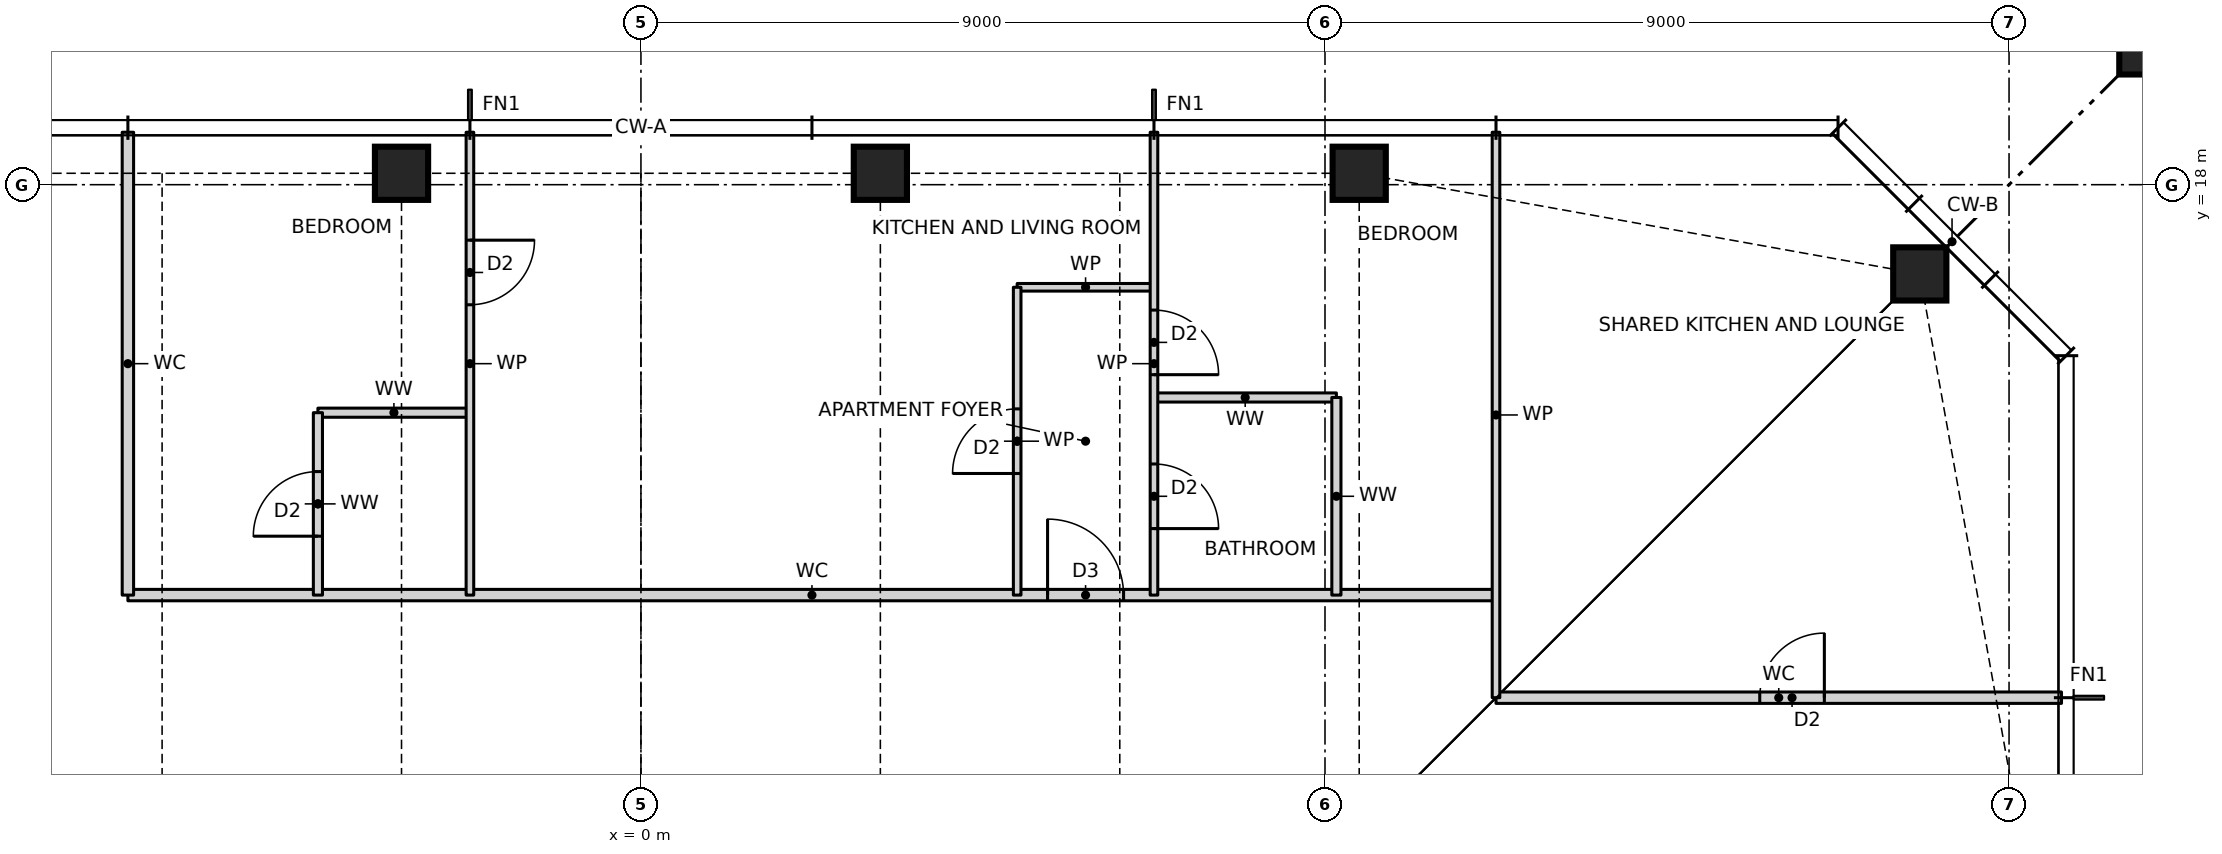
"""IFC4 building model, lengths in metres.
Left out: names, types, materials, properties, quantities, classifications, styles, units other than length and angle.
Written with IfcOpenShell. Run it as: python <this file> out.ifc"""

import sys

from ifc_helpers import new_model, si_unit, direction, frame, frame_2d, origin, origin_2d, place, context, subcontext, project, spatial, rectangle, hollow_rectangle, i_section, extrude, element, fill, save


model = new_model("IFC4")
c1 = context("Model", 3, precision=1e-05, world=origin(), true_north=direction((0.0, 1.0)))
c2 = subcontext(c1, "Body", "Model", "MODEL_VIEW")
j1 = project(units=[si_unit("LENGTHUNIT", "METRE"), si_unit("PLANEANGLEUNIT", "RADIAN")], contexts=[c1])
p1 = place(None, origin())
s1 = spatial("IfcSite", under=j1, at=p1, CompositionType="ELEMENT")
p2 = place(p1, origin())
s2 = spatial("IfcBuilding", under=s1, at=p2, CompositionType="ELEMENT")
p3 = place(p2, frame((0.0, 0.0, 181.0)))
s3 = spatial("IfcBuildingStorey", under=s2, at=p3, CompositionType="ELEMENT", Elevation=181.0)
for number, where, z_axis, x_axis in (
    (1, (16.826, 16.826, 0.0), (0.0, 0.0, 1.0), (1.0, 0.0, 0.0)),
    (2, (9.45, 18.15, 0.0), (0.0, 0.0, 1.0), (1.0, 0.0, 0.0)),
    (3, (3.15, 18.15, 0.0), (0.0, 0.0, 1.0), (1.0, 0.0, 0.0)),
    (4, (-3.15, 18.15, 0.0), (0.0, 0.0, 1.0), (1.0, 0.0, 0.0)),
):
    element("IfcColumn", number, at=place(p3, frame(where, z_axis=z_axis, x_axis=x_axis)), inside=s3, PredefinedType="COLUMN", context=c2, shape_type="SweptSolid", body=[
        extrude(hollow_rectangle(XDim=0.7, YDim=0.7, WallThickness=0.06, at=origin_2d()), origin(), (0.0, 0.0, 1.0), 3.5),
    ])
p4 = place(p3, frame((21.65, 21.65, 0.0), z_axis=(0.0, 0.0, 1.0), x_axis=(1.0, 0.0, 0.0)))
e5 = element("IfcColumn", 5, at=p4, inside=s3, PredefinedType="COLUMN", context=c2, shape_type="SweptSolid", body=[
    extrude(rectangle(XDim=4.4, YDim=4.4, at=origin_2d()), origin(), (0.0, 0.0, 1.0), 3.5),
    extrude(i_section(OverallWidth=0.478, OverallDepth=0.599, WebThickness=0.1, FlangeThickness=0.14, at=origin_2d()), origin(), (0.0, 0.0, 1.0), 3.5),
])
p5 = place(p3, frame((11.25, 11.25, 0.0), z_axis=(0.0, 0.0, 1.0), x_axis=(1.0, 0.0, 0.0)))
e6 = element("IfcWall", 6, at=p5, inside=s3, PredefinedType="PARTITIONING", context=c2, shape_type="SweptSolid", body=[
    extrude(rectangle(XDim=7.44, YDim=0.15, at=frame_2d((3.72, 0.0))), origin(), (0.0, 0.0, 1.0), 3.27),
])
p6 = place(p5, frame((3.47, 0.0, 0.0)))
e7 = element("IfcOpeningElement", 7, at=p6, cuts=e6, PredefinedType="OPENING", context=c2, shape_type="SweptSolid", body=[
    extrude(rectangle(XDim=0.85, YDim=2.1, at=frame_2d((0.425, 1.05))), frame((0.0, 0.085, 0.0), z_axis=(0.0, -1.0, 0.0), x_axis=(1.0, 0.0, 0.0)), (0.0, 0.0, 1.0), 0.17),
])
p7 = place(p3, frame((-6.75, 12.6, 0.0), z_axis=(0.0, 0.0, 1.0), x_axis=(1.0, 0.0, 0.0)))
e8 = element("IfcWall", 8, at=p7, inside=s3, PredefinedType="PARTITIONING", context=c2, shape_type="SweptSolid", body=[
    extrude(rectangle(XDim=18.0, YDim=0.15, at=frame_2d((9.0, 0.0))), origin(), (0.0, 0.0, 1.0), 3.27),
])
p8 = place(p7, frame((12.1, 0.0, 0.0)))
e9 = element("IfcOpeningElement", 9, at=p8, cuts=e8, PredefinedType="OPENING", context=c2, shape_type="SweptSolid", body=[
    extrude(rectangle(XDim=1.0, YDim=2.1, at=frame_2d((0.5, 1.05))), frame((0.0, 0.085, 0.0), z_axis=(0.0, -1.0, 0.0), x_axis=(1.0, 0.0, 0.0)), (0.0, 0.0, 1.0), 0.17),
])
p9 = place(p3, frame((-4.25, 15.0, 0.0), z_axis=(0.0, 0.0, 1.0), x_axis=(1.0, 0.0, 0.0)))
e10 = element("IfcWall", 10, at=p9, inside=s3, PredefinedType="PARTITIONING", context=c2, shape_type="SweptSolid", body=[
    extrude(rectangle(XDim=2.0, YDim=0.12, at=frame_2d((1.0, 0.0))), origin(), (0.0, 0.0, 1.0), 3.27),
])
p10 = place(p3, frame((6.75, 15.2, 0.0), z_axis=(0.0, 0.0, 1.0), x_axis=(1.0, 0.0, 0.0)))
e11 = element("IfcWall", 11, at=p10, inside=s3, PredefinedType="PARTITIONING", context=c2, shape_type="SweptSolid", body=[
    extrude(rectangle(XDim=2.4, YDim=0.12, at=frame_2d((1.2, 0.0))), origin(), (0.0, 0.0, 1.0), 3.27),
])
p11 = place(p3, frame((4.95, 16.65, 0.0), z_axis=(0.0, 0.0, 1.0), x_axis=(1.0, 0.0, 0.0)))
e12 = element("IfcWall", 12, at=p11, inside=s3, PredefinedType="PARTITIONING", context=c2, shape_type="SweptSolid", body=[
    extrude(rectangle(XDim=1.8, YDim=0.1, at=frame_2d((0.9, 0.0))), origin(), (0.0, 0.0, 1.0), 3.27),
])
p12 = place(p3, frame((11.25, 11.25, 0.0), z_axis=(0.0, 0.0, 1.0), x_axis=(0.0, 1.0, 0.0)))
e13 = element("IfcWall", 13, at=p12, inside=s3, PredefinedType="PARTITIONING", context=c2, shape_type="SweptSolid", body=[
    extrude(rectangle(XDim=7.44, YDim=0.1, at=frame_2d((3.72, 0.0))), origin(), (0.0, 0.0, 1.0), 3.27),
])
p13 = place(p3, frame((9.15, 12.6, 0.0), z_axis=(0.0, 0.0, 1.0), x_axis=(0.0, 1.0, 0.0)))
e14 = element("IfcWall", 14, at=p13, inside=s3, PredefinedType="PARTITIONING", context=c2, shape_type="SweptSolid", body=[
    extrude(rectangle(XDim=2.6, YDim=0.12, at=frame_2d((1.3, 0.0))), origin(), (0.0, 0.0, 1.0), 3.27),
])
p14 = place(p3, frame((6.75, 12.6, 0.0), z_axis=(0.0, 0.0, 1.0), x_axis=(0.0, 1.0, 0.0)))
e15 = element("IfcWall", 15, at=p14, inside=s3, PredefinedType="PARTITIONING", context=c2, shape_type="SweptSolid", body=[
    extrude(rectangle(XDim=6.09, YDim=0.1, at=frame_2d((3.045, 0.0))), origin(), (0.0, 0.0, 1.0), 3.27),
])
p15 = place(p14, frame((2.9, 0.0, 0.0)))
e16 = element("IfcOpeningElement", 16, at=p15, cuts=e15, PredefinedType="OPENING", context=c2, shape_type="SweptSolid", body=[
    extrude(rectangle(XDim=0.85, YDim=2.1, at=frame_2d((0.425, 1.05))), frame((0.0, 0.06, 0.0), z_axis=(0.0, -1.0, 0.0), x_axis=(1.0, 0.0, 0.0)), (0.0, 0.0, 1.0), 0.12),
])
p16 = place(p14, frame((0.875, 0.0, 0.0)))
e17 = element("IfcOpeningElement", 17, at=p16, cuts=e15, PredefinedType="OPENING", context=c2, shape_type="SweptSolid", body=[
    extrude(rectangle(XDim=0.85, YDim=2.1, at=frame_2d((0.425, 1.05))), frame((0.0, 0.06, 0.0), z_axis=(0.0, -1.0, 0.0), x_axis=(1.0, 0.0, 0.0)), (0.0, 0.0, 1.0), 0.12),
])
p17 = place(p3, frame((4.95, 12.6, 0.0), z_axis=(0.0, 0.0, 1.0), x_axis=(0.0, 1.0, 0.0)))
e18 = element("IfcWall", 18, at=p17, inside=s3, PredefinedType="PARTITIONING", context=c2, shape_type="SweptSolid", body=[
    extrude(rectangle(XDim=4.05, YDim=0.1, at=frame_2d((2.025, 0.0))), origin(), (0.0, 0.0, 1.0), 3.27),
])
p18 = place(p17, frame((1.6, 0.0, 0.0)))
e19 = element("IfcOpeningElement", 19, at=p18, cuts=e18, PredefinedType="OPENING", context=c2, shape_type="SweptSolid", body=[
    extrude(rectangle(XDim=0.85, YDim=2.1, at=frame_2d((0.425, 1.05))), frame((0.0, 0.06, 0.0), z_axis=(0.0, -1.0, 0.0), x_axis=(1.0, 0.0, 0.0)), (0.0, 0.0, 1.0), 0.12),
])
p19 = place(p3, frame((-2.25, 12.6, 0.0), z_axis=(0.0, 0.0, 1.0), x_axis=(0.0, 1.0, 0.0)))
e20 = element("IfcWall", 20, at=p19, inside=s3, PredefinedType="PARTITIONING", context=c2, shape_type="SweptSolid", body=[
    extrude(rectangle(XDim=6.09, YDim=0.1, at=frame_2d((3.045, 0.0))), origin(), (0.0, 0.0, 1.0), 3.27),
])
p20 = place(p19, frame((3.82, 0.0, 0.0)))
e21 = element("IfcOpeningElement", 21, at=p20, cuts=e20, PredefinedType="OPENING", context=c2, shape_type="SweptSolid", body=[
    extrude(rectangle(XDim=0.85, YDim=2.1, at=frame_2d((0.425, 1.05))), frame((0.0, 0.06, 0.0), z_axis=(0.0, -1.0, 0.0), x_axis=(1.0, 0.0, 0.0)), (0.0, 0.0, 1.0), 0.12),
])
p21 = place(p3, frame((-4.25, 12.6, 0.0), z_axis=(0.0, 0.0, 1.0), x_axis=(0.0, 1.0, 0.0)))
e22 = element("IfcWall", 22, at=p21, inside=s3, PredefinedType="PARTITIONING", context=c2, shape_type="SweptSolid", body=[
    extrude(rectangle(XDim=2.4, YDim=0.12, at=frame_2d((1.2, 0.0))), origin(), (0.0, 0.0, 1.0), 3.27),
])
p22 = place(p21, frame((0.775, 0.0, 0.0)))
e23 = element("IfcOpeningElement", 23, at=p22, cuts=e22, PredefinedType="OPENING", context=c2, shape_type="SweptSolid", body=[
    extrude(rectangle(XDim=0.85, YDim=2.1, at=frame_2d((0.425, 1.05))), frame((0.0, 0.07, 0.0), z_axis=(0.0, -1.0, 0.0), x_axis=(1.0, 0.0, 0.0)), (0.0, 0.0, 1.0), 0.14),
])
p23 = place(p3, frame((-6.75, 12.6, 0.0), z_axis=(0.0, 0.0, 1.0), x_axis=(0.0, 1.0, 0.0)))
e24 = element("IfcWall", 24, at=p23, inside=s3, PredefinedType="PARTITIONING", context=c2, shape_type="SweptSolid", body=[
    extrude(rectangle(XDim=6.09, YDim=0.15, at=frame_2d((3.045, 0.0))), origin(), (0.0, 0.0, 1.0), 3.27),
])
p24 = place(p8, origin())
e25 = element("IfcDoor", 25, at=p24, inside=s3, OperationType="SINGLE_SWING_LEFT", PredefinedType="DOOR", context=c2, shape_type="SweptSolid", body=[
    extrude(rectangle(XDim=1.0, YDim=2.1, at=frame_2d((0.5, 1.05))), frame((0.0, 0.025, 0.0), z_axis=(0.0, -1.0, 0.0), x_axis=(1.0, 0.0, 0.0)), (0.0, 0.0, 1.0), 0.05),
])
fill(e9, e25)
p25 = place(p18, origin())
e26 = element("IfcDoor", 26, at=p25, inside=s3, OperationType="SINGLE_SWING_LEFT", PredefinedType="DOOR", context=c2, shape_type="SweptSolid", body=[
    extrude(rectangle(XDim=0.85, YDim=2.1, at=frame_2d((0.425, 1.05))), frame((0.0, 0.025, 0.0), z_axis=(0.0, -1.0, 0.0), x_axis=(1.0, 0.0, 0.0)), (0.0, 0.0, 1.0), 0.05),
])
fill(e19, e26)
p26 = place(p15, frame((0.85, 0.0, 0.0), z_axis=(0.0, 0.0, 1.0), x_axis=(-1.0, 0.0, 0.0)))
e27 = element("IfcDoor", 27, at=p26, inside=s3, OperationType="SINGLE_SWING_RIGHT", PredefinedType="DOOR", context=c2, shape_type="SweptSolid", body=[
    extrude(rectangle(XDim=0.85, YDim=2.1, at=frame_2d((0.425, 1.05))), frame((0.0, 0.025, 0.0), z_axis=(0.0, -1.0, 0.0), x_axis=(1.0, 0.0, 0.0)), (0.0, 0.0, 1.0), 0.05),
])
fill(e16, e27)
p27 = place(p16, frame((0.85, 0.0, 0.0), z_axis=(0.0, 0.0, 1.0), x_axis=(-1.0, 0.0, 0.0)))
e28 = element("IfcDoor", 28, at=p27, inside=s3, OperationType="SINGLE_SWING_RIGHT", PredefinedType="DOOR", context=c2, shape_type="SweptSolid", body=[
    extrude(rectangle(XDim=0.85, YDim=2.1, at=frame_2d((0.425, 1.05))), frame((0.0, 0.025, 0.0), z_axis=(0.0, -1.0, 0.0), x_axis=(1.0, 0.0, 0.0)), (0.0, 0.0, 1.0), 0.05),
])
fill(e17, e28)
p28 = place(p20, frame((0.85, 0.0, 0.0), z_axis=(0.0, 0.0, 1.0), x_axis=(-1.0, 0.0, 0.0)))
e29 = element("IfcDoor", 29, at=p28, inside=s3, OperationType="SINGLE_SWING_LEFT", PredefinedType="DOOR", context=c2, shape_type="SweptSolid", body=[
    extrude(rectangle(XDim=0.85, YDim=2.1, at=frame_2d((0.425, 1.05))), frame((0.0, 0.025, 0.0), z_axis=(0.0, -1.0, 0.0), x_axis=(1.0, 0.0, 0.0)), (0.0, 0.0, 1.0), 0.05),
])
fill(e21, e29)
p29 = place(p22, origin())
e30 = element("IfcDoor", 30, at=p29, inside=s3, OperationType="SINGLE_SWING_LEFT", PredefinedType="DOOR", context=c2, shape_type="SweptSolid", body=[
    extrude(rectangle(XDim=0.85, YDim=2.1, at=frame_2d((0.425, 1.05))), frame((0.0, 0.025, 0.0), z_axis=(0.0, -1.0, 0.0), x_axis=(1.0, 0.0, 0.0)), (0.0, 0.0, 1.0), 0.05),
])
fill(e23, e30)
p30 = place(p6, origin())
e31 = element("IfcDoor", 31, at=p30, inside=s3, OperationType="SINGLE_SWING_RIGHT", PredefinedType="DOOR", context=c2, shape_type="SweptSolid", body=[
    extrude(rectangle(XDim=0.85, YDim=2.1, at=frame_2d((0.425, 1.05))), frame((0.0, 0.025, 0.0), z_axis=(0.0, -1.0, 0.0), x_axis=(1.0, 0.0, 0.0)), (0.0, 0.0, 1.0), 0.05),
])
fill(e7, e31)
save(model, sys.argv[1])
